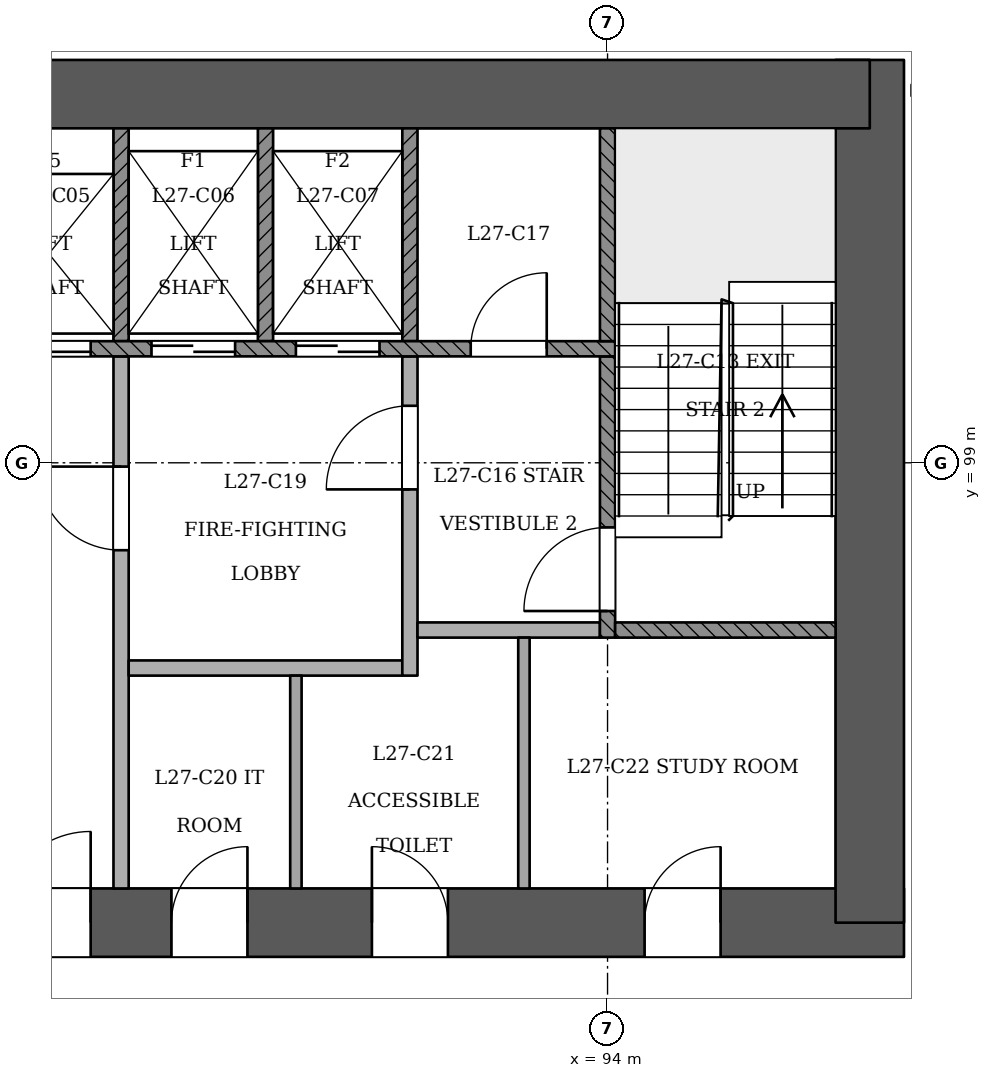
"""IFC4 building model, lengths in metres.
Left out: names, types, materials, properties, quantities, classifications, styles, units other than length and angle.
Written with IfcOpenShell. Run it as: python <this file> out.ifc"""

import sys

from ifc_helpers import new_model, si_unit, direction, frame, frame_2d, origin, place, context, subcontext, project, spatial, rectangle, extrude, element, fill, save


model = new_model("IFC4")
c1 = context("Model", 3, precision=1e-05, world=origin(), true_north=direction((0.0, 1.0)))
c2 = subcontext(c1, "Body", "Model", "MODEL_VIEW")
j1 = project(units=[si_unit("LENGTHUNIT", "METRE"), si_unit("PLANEANGLEUNIT", "RADIAN")], contexts=[c1])
p1 = place(None, origin())
s1 = spatial("IfcSite", under=j1, at=p1, CompositionType="ELEMENT")
p2 = place(p1, origin())
s2 = spatial("IfcBuilding", under=s1, at=p2, CompositionType="ELEMENT")
p3 = place(p2, frame((0.0, 0.0, 108.0)))
s3 = spatial("IfcBuildingStorey", under=s2, at=p3, CompositionType="ELEMENT", Elevation=108.0)
p4 = place(p3, frame((72.55, 92.95, 0.0), z_axis=(0.0, 0.0, 1.0), x_axis=(1.0, 0.0, 0.0)))
e1 = element("IfcWall", 1, at=p4, inside=s3, PredefinedType="SHEAR", context=c2, shape_type="SweptSolid", body=[
    extrude(rectangle(XDim=25.35, YDim=0.9, at=frame_2d((12.675, 0.0))), origin(), (0.0, 0.0, 1.0), 3.6),
])
p5 = place(p4, frame((1.25, 0.0, 0.0)))
e2 = element("IfcOpeningElement", 2, at=p5, cuts=e1, PredefinedType="OPENING", context=c2, shape_type="SweptSolid", body=[
    extrude(rectangle(XDim=1.2, YDim=2.1, at=frame_2d((0.6, 1.05))), frame((0.0, 0.46, 0.0), z_axis=(0.0, -1.0, 0.0), x_axis=(1.0, 0.0, 0.0)), (0.0, 0.0, 1.0), 0.921),
])
p6 = place(p4, frame((3.45, 0.0, 0.0)))
e3 = element("IfcOpeningElement", 3, at=p6, cuts=e1, PredefinedType="OPENING", context=c2, shape_type="SweptSolid", body=[
    extrude(rectangle(XDim=1.2, YDim=2.1, at=frame_2d((0.6, 1.05))), frame((0.0, 0.46, 0.0), z_axis=(0.0, -1.0, 0.0), x_axis=(1.0, 0.0, 0.0)), (0.0, 0.0, 1.0), 0.921),
])
p7 = place(p4, frame((13.45, 0.0, 0.0)))
e4 = element("IfcOpeningElement", 4, at=p7, cuts=e1, PredefinedType="OPENING", context=c2, shape_type="SweptSolid", body=[
    extrude(rectangle(XDim=1.2, YDim=2.1, at=frame_2d((0.6, 1.05))), frame((0.0, 0.46, 0.0), z_axis=(0.0, -1.0, 0.0), x_axis=(1.0, 0.0, 0.0)), (0.0, 0.0, 1.0), 0.921),
])
p8 = place(p4, frame((15.712, 0.0, 0.0)))
e5 = element("IfcOpeningElement", 5, at=p8, cuts=e1, PredefinedType="OPENING", context=c2, shape_type="SweptSolid", body=[
    extrude(rectangle(XDim=1.0, YDim=2.1, at=frame_2d((0.5, 1.05))), frame((0.0, 0.46, 0.0), z_axis=(0.0, -1.0, 0.0), x_axis=(1.0, 0.0, 0.0)), (0.0, 0.0, 1.0), 0.921),
])
p9 = place(p4, frame((18.35, 0.0, 0.0)))
e6 = element("IfcOpeningElement", 6, at=p9, cuts=e1, PredefinedType="OPENING", context=c2, shape_type="SweptSolid", body=[
    extrude(rectangle(XDim=1.0, YDim=2.1, at=frame_2d((0.5, 1.05))), frame((0.0, 0.46, 0.0), z_axis=(0.0, -1.0, 0.0), x_axis=(1.0, 0.0, 0.0)), (0.0, 0.0, 1.0), 0.921),
])
p10 = place(p4, frame((21.938, 0.0, 0.0)))
e7 = element("IfcOpeningElement", 7, at=p10, cuts=e1, PredefinedType="OPENING", context=c2, shape_type="SweptSolid", body=[
    extrude(rectangle(XDim=1.0, YDim=2.1, at=frame_2d((0.5, 1.05))), frame((0.0, 0.46, 0.0), z_axis=(0.0, -1.0, 0.0), x_axis=(1.0, 0.0, 0.0)), (0.0, 0.0, 1.0), 0.921),
])
p11 = place(p3, frame((97.45, 92.95, 0.0), z_axis=(0.0, 0.0, 1.0), x_axis=(0.0, 1.0, 0.0)))
e8 = element("IfcWall", 8, at=p11, inside=s3, PredefinedType="SHEAR", context=c2, shape_type="SweptSolid", body=[
    extrude(rectangle(XDim=11.35, YDim=0.9, at=frame_2d((5.675, 0.0))), origin(), (0.0, 0.0, 1.0), 3.6),
])
p12 = place(p3, frame((97.45, 103.85, 0.0), z_axis=(0.0, 0.0, 1.0), x_axis=(-1.0, 0.0, 0.0)))
e9 = element("IfcWall", 9, at=p12, inside=s3, PredefinedType="SHEAR", context=c2, shape_type="SweptSolid", body=[
    extrude(rectangle(XDim=25.35, YDim=0.9, at=frame_2d((12.675, 0.0))), origin(), (0.0, 0.0, 1.0), 3.6),
])
p13 = place(p3, frame((85.381, 61.895, 0.0), z_axis=(0.0, 0.0, 1.0), x_axis=(0.499996899578, 0.866027193807, 0.0)))
e10 = element("IfcWall", 10, at=p13, inside=s3, PredefinedType="PARTITIONING", context=c2, shape_type="SweptSolid", body=[
    extrude(rectangle(XDim=41.505, YDim=0.15, at=frame_2d((20.752, 0.0))), origin(), (0.0, 0.0, 1.0), 2.7),
])
p14 = place(p13, frame((0.226, 0.0, 0.0)))
e11 = element("IfcOpeningElement", 11, at=p14, cuts=e10, PredefinedType="OPENING", context=c2, shape_type="SweptSolid", body=[
    extrude(rectangle(XDim=1.2, YDim=2.1, at=frame_2d((0.6, 1.05))), frame((0.0, 0.085, 0.0), z_axis=(0.0, -1.0, 0.0), x_axis=(1.0, 0.0, 0.0)), (0.0, 0.0, 1.0), 0.171),
])
p15 = place(p13, frame((8.903, 0.0, 0.0)))
e12 = element("IfcOpeningElement", 12, at=p15, cuts=e10, PredefinedType="OPENING", context=c2, shape_type="SweptSolid", body=[
    extrude(rectangle(XDim=1.2, YDim=2.1, at=frame_2d((0.6, 1.05))), frame((0.0, 0.085, 0.0), z_axis=(0.0, -1.0, 0.0), x_axis=(1.0, 0.0, 0.0)), (0.0, 0.0, 1.0), 0.171),
])
p16 = place(p13, frame((22.403, 0.0, 0.0)))
e13 = element("IfcOpeningElement", 13, at=p16, cuts=e10, PredefinedType="OPENING", context=c2, shape_type="SweptSolid", body=[
    extrude(rectangle(XDim=1.2, YDim=2.1, at=frame_2d((0.6, 1.05))), frame((0.0, 0.085, 0.0), z_axis=(0.0, -1.0, 0.0), x_axis=(1.0, 0.0, 0.0)), (0.0, 0.0, 1.0), 0.171),
])
p17 = place(p13, frame((32.553, 0.0, 0.0)))
e14 = element("IfcOpeningElement", 14, at=p17, cuts=e10, PredefinedType="OPENING", context=c2, shape_type="SweptSolid", body=[
    extrude(rectangle(XDim=1.2, YDim=2.1, at=frame_2d((0.6, 1.05))), frame((0.0, 0.085, 0.0), z_axis=(0.0, -1.0, 0.0), x_axis=(1.0, 0.0, 0.0)), (0.0, 0.0, 1.0), 0.171),
])
p18 = place(p13, frame((40.024, 0.0, 0.0)))
e15 = element("IfcOpeningElement", 15, at=p18, cuts=e10, PredefinedType="OPENING", context=c2, shape_type="SweptSolid", body=[
    extrude(rectangle(XDim=1.2, YDim=2.1, at=frame_2d((0.6, 1.05))), frame((0.0, 0.085, 0.0), z_axis=(0.0, -1.0, 0.0), x_axis=(1.0, 0.0, 0.0)), (0.0, 0.0, 1.0), 0.171),
])
p19 = place(p3, frame((87.6, 93.4, 0.0), z_axis=(0.0, 0.0, 1.0), x_axis=(0.0, 1.0, 0.0)))
e16 = element("IfcWall", 16, at=p19, inside=s3, PredefinedType="PARTITIONING", context=c2, shape_type="SweptSolid", body=[
    extrude(rectangle(XDim=7.0, YDim=0.2, at=frame_2d((3.5, 0.0))), origin(), (0.0, 0.0, 1.0), 3.1),
])
p20 = place(p19, frame((4.45, 0.0, 0.0)))
e17 = element("IfcOpeningElement", 17, at=p20, cuts=e16, PredefinedType="OPENING", context=c2, shape_type="SweptSolid", body=[
    extrude(rectangle(XDim=1.1, YDim=2.1, at=frame_2d((0.55, 1.05))), frame((0.0, 0.11, 0.0), z_axis=(0.0, -1.0, 0.0), x_axis=(1.0, 0.0, 0.0)), (0.0, 0.0, 1.0), 0.221),
])
p21 = place(p3, frame((89.9, 93.4, 0.0), z_axis=(0.0, 0.0, 1.0), x_axis=(0.0, 1.0, 0.0)))
e18 = element("IfcWall", 18, at=p21, inside=s3, PredefinedType="PARTITIONING", context=c2, shape_type="SweptSolid", body=[
    extrude(rectangle(XDim=2.8, YDim=0.15, at=frame_2d((1.4, 0.0))), origin(), (0.0, 0.0, 1.0), 3.1),
])
p22 = place(p3, frame((92.9, 93.4, 0.0), z_axis=(0.0, 0.0, 1.0), x_axis=(0.0, 1.0, 0.0)))
e19 = element("IfcWall", 19, at=p22, inside=s3, PredefinedType="PARTITIONING", context=c2, shape_type="SweptSolid", body=[
    extrude(rectangle(XDim=3.3, YDim=0.15, at=frame_2d((1.65, 0.0))), origin(), (0.0, 0.0, 1.0), 3.1),
])
p23 = place(p3, frame((87.7, 96.3, 0.0), z_axis=(0.0, 0.0, 1.0), x_axis=(1.0, 0.0, 0.0)))
e20 = element("IfcWall", 20, at=p23, inside=s3, PredefinedType="PARTITIONING", context=c2, shape_type="SweptSolid", body=[
    extrude(rectangle(XDim=3.6, YDim=0.2, at=frame_2d((1.8, 0.0))), origin(), (0.0, 0.0, 1.0), 3.1),
])
p24 = place(p3, frame((91.4, 96.2, 0.0), z_axis=(0.0, 0.0, 1.0), x_axis=(0.0, 1.0, 0.0)))
e21 = element("IfcWall", 21, at=p24, inside=s3, PredefinedType="PARTITIONING", context=c2, shape_type="SweptSolid", body=[
    extrude(rectangle(XDim=4.2, YDim=0.2, at=frame_2d((2.1, 0.0))), origin(), (0.0, 0.0, 1.0), 3.1),
])
p25 = place(p24, frame((2.45, 0.0, 0.0)))
e22 = element("IfcOpeningElement", 22, at=p25, cuts=e21, PredefinedType="OPENING", context=c2, shape_type="SweptSolid", body=[
    extrude(rectangle(XDim=1.1, YDim=2.1, at=frame_2d((0.55, 1.05))), frame((0.0, 0.11, 0.0), z_axis=(0.0, -1.0, 0.0), x_axis=(1.0, 0.0, 0.0)), (0.0, 0.0, 1.0), 0.221),
])
p26 = place(p3, frame((91.5, 96.8, 0.0), z_axis=(0.0, 0.0, 1.0), x_axis=(1.0, 0.0, 0.0)))
e23 = element("IfcWall", 23, at=p26, inside=s3, PredefinedType="PARTITIONING", context=c2, shape_type="SweptSolid", body=[
    extrude(rectangle(XDim=2.4, YDim=0.2, at=frame_2d((1.2, 0.0))), origin(), (0.0, 0.0, 1.0), 3.1),
])
p27 = place(p3, frame((94.0, 96.7, 0.0), z_axis=(0.0, 0.0, 1.0), x_axis=(0.0, 1.0, 0.0)))
e24 = element("IfcWall", 24, at=p27, inside=s3, PredefinedType="SOLIDWALL", context=c2, shape_type="SweptSolid", body=[
    extrude(rectangle(XDim=3.7, YDim=0.2, at=frame_2d((1.85, 0.0))), origin(), (0.0, 0.0, 1.0), 3.1),
])
p28 = place(p27, frame((0.35, 0.0, 0.0)))
e25 = element("IfcOpeningElement", 25, at=p28, cuts=e24, PredefinedType="OPENING", context=c2, shape_type="SweptSolid", body=[
    extrude(rectangle(XDim=1.1, YDim=2.1, at=frame_2d((0.55, 1.05))), frame((0.0, 0.11, 0.0), z_axis=(0.0, -1.0, 0.0), x_axis=(1.0, 0.0, 0.0)), (0.0, 0.0, 1.0), 0.221),
])
p29 = place(p3, frame((94.1, 96.8, 0.0), z_axis=(0.0, 0.0, 1.0), x_axis=(1.0, 0.0, 0.0)))
e26 = element("IfcWall", 26, at=p29, inside=s3, PredefinedType="SOLIDWALL", context=c2, shape_type="SweptSolid", body=[
    extrude(rectangle(XDim=2.9, YDim=0.2, at=frame_2d((1.45, 0.0))), origin(), (0.0, 0.0, 1.0), 3.1),
])
p30 = place(p3, frame((75.9, 100.5, 0.0), z_axis=(0.0, 0.0, 1.0), x_axis=(1.0, 0.0, 0.0)))
e27 = element("IfcWall", 27, at=p30, inside=s3, PredefinedType="SOLIDWALL", context=c2, shape_type="SweptSolid", body=[
    extrude(rectangle(XDim=18.2, YDim=0.2, at=frame_2d((9.1, 0.0))), origin(), (0.0, 0.0, 1.0), 3.1),
])
p31 = place(p30, frame((2.6, 0.0, 0.0)))
e28 = element("IfcOpeningElement", 28, at=p31, cuts=e27, PredefinedType="OPENING", context=c2, shape_type="SweptSolid", body=[
    extrude(rectangle(XDim=1.1, YDim=2.1, at=frame_2d((0.55, 1.05))), frame((0.0, 0.11, 0.0), z_axis=(0.0, -1.0, 0.0), x_axis=(1.0, 0.0, 0.0)), (0.0, 0.0, 1.0), 0.221),
])
p32 = place(p30, frame((4.5, 0.0, 0.0)))
e29 = element("IfcOpeningElement", 29, at=p32, cuts=e27, PredefinedType="OPENING", context=c2, shape_type="SweptSolid", body=[
    extrude(rectangle(XDim=1.1, YDim=2.1, at=frame_2d((0.55, 1.05))), frame((0.0, 0.11, 0.0), z_axis=(0.0, -1.0, 0.0), x_axis=(1.0, 0.0, 0.0)), (0.0, 0.0, 1.0), 0.221),
])
p33 = place(p30, frame((6.4, 0.0, 0.0)))
e30 = element("IfcOpeningElement", 30, at=p33, cuts=e27, PredefinedType="OPENING", context=c2, shape_type="SweptSolid", body=[
    extrude(rectangle(XDim=1.1, YDim=2.1, at=frame_2d((0.55, 1.05))), frame((0.0, 0.11, 0.0), z_axis=(0.0, -1.0, 0.0), x_axis=(1.0, 0.0, 0.0)), (0.0, 0.0, 1.0), 0.221),
])
p34 = place(p30, frame((8.3, 0.0, 0.0)))
e31 = element("IfcOpeningElement", 31, at=p34, cuts=e27, PredefinedType="OPENING", context=c2, shape_type="SweptSolid", body=[
    extrude(rectangle(XDim=1.1, YDim=2.1, at=frame_2d((0.55, 1.05))), frame((0.0, 0.11, 0.0), z_axis=(0.0, -1.0, 0.0), x_axis=(1.0, 0.0, 0.0)), (0.0, 0.0, 1.0), 0.221),
])
p35 = place(p30, frame((10.2, 0.0, 0.0)))
e32 = element("IfcOpeningElement", 32, at=p35, cuts=e27, PredefinedType="OPENING", context=c2, shape_type="SweptSolid", body=[
    extrude(rectangle(XDim=1.1, YDim=2.1, at=frame_2d((0.55, 1.05))), frame((0.0, 0.11, 0.0), z_axis=(0.0, -1.0, 0.0), x_axis=(1.0, 0.0, 0.0)), (0.0, 0.0, 1.0), 0.221),
])
p36 = place(p30, frame((12.1, 0.0, 0.0)))
e33 = element("IfcOpeningElement", 33, at=p36, cuts=e27, PredefinedType="OPENING", context=c2, shape_type="SweptSolid", body=[
    extrude(rectangle(XDim=1.1, YDim=2.1, at=frame_2d((0.55, 1.05))), frame((0.0, 0.11, 0.0), z_axis=(0.0, -1.0, 0.0), x_axis=(1.0, 0.0, 0.0)), (0.0, 0.0, 1.0), 0.221),
])
p37 = place(p30, frame((14.0, 0.0, 0.0)))
e34 = element("IfcOpeningElement", 34, at=p37, cuts=e27, PredefinedType="OPENING", context=c2, shape_type="SweptSolid", body=[
    extrude(rectangle(XDim=1.1, YDim=2.1, at=frame_2d((0.55, 1.05))), frame((0.0, 0.11, 0.0), z_axis=(0.0, -1.0, 0.0), x_axis=(1.0, 0.0, 0.0)), (0.0, 0.0, 1.0), 0.221),
])
p38 = place(p30, frame((0.65, 0.0, 0.0)))
e35 = element("IfcOpeningElement", 35, at=p38, cuts=e27, PredefinedType="OPENING", context=c2, shape_type="SweptSolid", body=[
    extrude(rectangle(XDim=1.0, YDim=2.1, at=frame_2d((0.5, 1.05))), frame((0.0, 0.11, 0.0), z_axis=(0.0, -1.0, 0.0), x_axis=(1.0, 0.0, 0.0)), (0.0, 0.0, 1.0), 0.221),
])
p39 = place(p30, frame((16.3, 0.0, 0.0)))
e36 = element("IfcOpeningElement", 36, at=p39, cuts=e27, PredefinedType="OPENING", context=c2, shape_type="SweptSolid", body=[
    extrude(rectangle(XDim=1.0, YDim=2.1, at=frame_2d((0.5, 1.05))), frame((0.0, 0.11, 0.0), z_axis=(0.0, -1.0, 0.0), x_axis=(1.0, 0.0, 0.0)), (0.0, 0.0, 1.0), 0.221),
])
for number, where, z_axis, x_axis in (
    (37, (87.6, 100.6, 0.0), (0.0, 0.0, 1.0), (0.0, 1.0, 0.0)),
    (38, (89.5, 100.6, 0.0), (0.0, 0.0, 1.0), (0.0, 1.0, 0.0)),
    (39, (91.4, 100.6, 0.0), (0.0, 0.0, 1.0), (0.0, 1.0, 0.0)),
    (40, (94.0, 100.6, 0.0), (0.0, 0.0, 1.0), (0.0, 1.0, 0.0)),
):
    element("IfcWall", number, at=place(p3, frame(where, z_axis=z_axis, x_axis=x_axis)), inside=s3, PredefinedType="SOLIDWALL", context=c2, shape_type="SweptSolid", body=[
        extrude(rectangle(XDim=2.8, YDim=0.2, at=frame_2d((1.4, 0.0))), origin(), (0.0, 0.0, 1.0), 3.1),
    ])
p40 = place(p35, origin())
e41 = element("IfcDoor", 41, at=p40, inside=s3, OperationType="SLIDING_TO_RIGHT", PredefinedType="NOTDEFINED", context=c2, shape_type="SweptSolid", body=[
    extrude(rectangle(XDim=1.1, YDim=2.1, at=frame_2d((0.55, 1.05))), frame((0.0, 0.025, 0.0), z_axis=(0.0, -1.0, 0.0), x_axis=(1.0, 0.0, 0.0)), (0.0, 0.0, 1.0), 0.05),
])
fill(e32, e41)
p41 = place(p36, origin())
e42 = element("IfcDoor", 42, at=p41, inside=s3, OperationType="SLIDING_TO_RIGHT", PredefinedType="NOTDEFINED", context=c2, shape_type="SweptSolid", body=[
    extrude(rectangle(XDim=1.1, YDim=2.1, at=frame_2d((0.55, 1.05))), frame((0.0, 0.025, 0.0), z_axis=(0.0, -1.0, 0.0), x_axis=(1.0, 0.0, 0.0)), (0.0, 0.0, 1.0), 0.05),
])
fill(e33, e42)
p42 = place(p37, origin())
e43 = element("IfcDoor", 43, at=p42, inside=s3, OperationType="SLIDING_TO_LEFT", PredefinedType="NOTDEFINED", context=c2, shape_type="SweptSolid", body=[
    extrude(rectangle(XDim=1.1, YDim=2.1, at=frame_2d((0.55, 1.05))), frame((0.0, 0.025, 0.0), z_axis=(0.0, -1.0, 0.0), x_axis=(1.0, 0.0, 0.0)), (0.0, 0.0, 1.0), 0.05),
])
fill(e34, e43)
p43 = place(p28, origin())
e44 = element("IfcDoor", 44, at=p43, inside=s3, OperationType="SINGLE_SWING_LEFT", PredefinedType="NOTDEFINED", context=c2, shape_type="SweptSolid", body=[
    extrude(rectangle(XDim=1.1, YDim=2.1, at=frame_2d((0.55, 1.05))), frame((0.0, 0.025, 0.0), z_axis=(0.0, -1.0, 0.0), x_axis=(1.0, 0.0, 0.0)), (0.0, 0.0, 1.0), 0.05),
])
fill(e25, e44)
p44 = place(p20, origin())
e45 = element("IfcDoor", 45, at=p44, inside=s3, OperationType="SINGLE_SWING_RIGHT", PredefinedType="NOTDEFINED", context=c2, shape_type="SweptSolid", body=[
    extrude(rectangle(XDim=1.1, YDim=2.1, at=frame_2d((0.55, 1.05))), frame((0.0, 0.025, 0.0), z_axis=(0.0, -1.0, 0.0), x_axis=(1.0, 0.0, 0.0)), (0.0, 0.0, 1.0), 0.05),
])
fill(e17, e45)
p45 = place(p25, origin())
e46 = element("IfcDoor", 46, at=p45, inside=s3, OperationType="SINGLE_SWING_LEFT", PredefinedType="NOTDEFINED", context=c2, shape_type="SweptSolid", body=[
    extrude(rectangle(XDim=1.1, YDim=2.1, at=frame_2d((0.55, 1.05))), frame((0.0, 0.025, 0.0), z_axis=(0.0, -1.0, 0.0), x_axis=(1.0, 0.0, 0.0)), (0.0, 0.0, 1.0), 0.05),
])
fill(e22, e46)
p46 = place(p7, origin())
e47 = element("IfcDoor", 47, at=p46, inside=s3, OperationType="SINGLE_SWING_RIGHT", PredefinedType="NOTDEFINED", context=c2, shape_type="SweptSolid", body=[
    extrude(rectangle(XDim=1.2, YDim=2.1, at=frame_2d((0.6, 1.05))), frame((0.0, 0.025, 0.0), z_axis=(0.0, -1.0, 0.0), x_axis=(1.0, 0.0, 0.0)), (0.0, 0.0, 1.0), 0.05),
])
fill(e4, e47)
p47 = place(p39, origin())
e48 = element("IfcDoor", 48, at=p47, inside=s3, OperationType="SINGLE_SWING_RIGHT", PredefinedType="NOTDEFINED", context=c2, shape_type="SweptSolid", body=[
    extrude(rectangle(XDim=1.0, YDim=2.1, at=frame_2d((0.5, 1.05))), frame((0.0, 0.025, 0.0), z_axis=(0.0, -1.0, 0.0), x_axis=(1.0, 0.0, 0.0)), (0.0, 0.0, 1.0), 0.05),
])
fill(e36, e48)
p48 = place(p8, origin())
e49 = element("IfcDoor", 49, at=p48, inside=s3, OperationType="SINGLE_SWING_RIGHT", PredefinedType="NOTDEFINED", context=c2, shape_type="SweptSolid", body=[
    extrude(rectangle(XDim=1.0, YDim=2.1, at=frame_2d((0.5, 1.05))), frame((0.0, 0.025, 0.0), z_axis=(0.0, -1.0, 0.0), x_axis=(1.0, 0.0, 0.0)), (0.0, 0.0, 1.0), 0.05),
])
fill(e5, e49)
p49 = place(p9, origin())
e50 = element("IfcDoor", 50, at=p49, inside=s3, OperationType="SINGLE_SWING_LEFT", PredefinedType="NOTDEFINED", context=c2, shape_type="SweptSolid", body=[
    extrude(rectangle(XDim=1.0, YDim=2.1, at=frame_2d((0.5, 1.05))), frame((0.0, 0.025, 0.0), z_axis=(0.0, -1.0, 0.0), x_axis=(1.0, 0.0, 0.0)), (0.0, 0.0, 1.0), 0.05),
])
fill(e6, e50)
p50 = place(p10, origin())
e51 = element("IfcDoor", 51, at=p50, inside=s3, OperationType="SINGLE_SWING_RIGHT", PredefinedType="NOTDEFINED", context=c2, shape_type="SweptSolid", body=[
    extrude(rectangle(XDim=1.0, YDim=2.1, at=frame_2d((0.5, 1.05))), frame((0.0, 0.025, 0.0), z_axis=(0.0, -1.0, 0.0), x_axis=(1.0, 0.0, 0.0)), (0.0, 0.0, 1.0), 0.05),
])
fill(e7, e51)
save(model, sys.argv[1])
